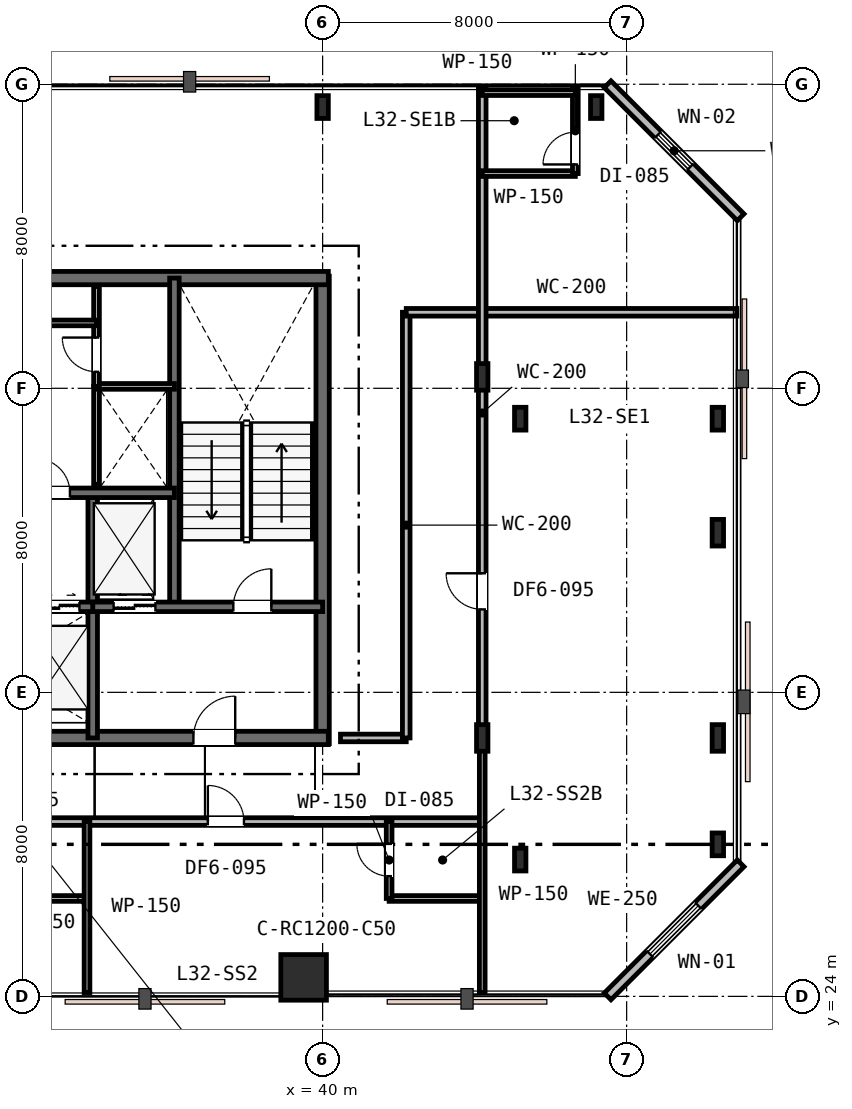
"""IFC4 building model, lengths in metres.
Left out: names, types, materials, properties, quantities, classifications, styles, units other than length and angle.
Written with IfcOpenShell. Run it as: python <this file> out.ifc"""

import sys

from ifc_helpers import new_model, si_unit, direction, frame, frame_2d, origin, origin_2d, place, context, subcontext, project, spatial, rectangle, i_section, extrude, element, fill, save


model = new_model("IFC4")
c1 = context("Model", 3, precision=1e-05, world=origin(), true_north=direction((0.0, 1.0)))
c2 = subcontext(c1, "Body", "Model", "MODEL_VIEW")
j1 = project(units=[si_unit("LENGTHUNIT", "METRE"), si_unit("PLANEANGLEUNIT", "RADIAN")], contexts=[c1])
p1 = place(None, origin())
s1 = spatial("IfcSite", under=j1, at=p1, CompositionType="ELEMENT")
p2 = place(p1, origin())
s2 = spatial("IfcBuilding", under=s1, at=p2, CompositionType="ELEMENT")
p3 = place(p2, frame((0.0, 0.0, 126.0)))
s3 = spatial("IfcBuildingStorey", under=s2, at=p3, CompositionType="ELEMENT", Elevation=126.0)
p4 = place(p3, frame((40.0, 30.65, 0.0), z_axis=(0.0, 0.0, 1.0), x_axis=(0.0, 1.0, 0.0)))
e1 = element("IfcWall", 1, at=p4, inside=s3, PredefinedType="SHEAR", context=c2, shape_type="SweptSolid", body=[
    extrude(rectangle(XDim=12.3, YDim=0.35, at=frame_2d((6.15, 0.0))), origin(), (0.0, 0.0, 1.0), 3.6),
])
p5 = place(p3, frame((15.85, 42.9, 0.0), z_axis=(0.0, 0.0, 1.0), x_axis=(1.0, 0.0, 0.0)))
e2 = element("IfcWall", 2, at=p5, inside=s3, PredefinedType="SHEAR", context=c2, shape_type="SweptSolid", body=[
    extrude(rectangle(XDim=24.3, YDim=0.35, at=frame_2d((12.15, 0.0))), origin(), (0.0, 0.0, 1.0), 3.6),
])
p6 = place(p3, frame((28.95, 30.8, 0.0), z_axis=(0.0, 0.0, 1.0), x_axis=(1.0, 0.0, 0.0)))
e3 = element("IfcWall", 3, at=p6, inside=s3, PredefinedType="SHEAR", context=c2, shape_type="SweptSolid", body=[
    extrude(rectangle(XDim=11.2, YDim=0.35, at=frame_2d((5.6, 0.0))), origin(), (0.0, 0.0, 1.0), 3.6),
])
p7 = place(p6, frame((7.65, 0.0, 0.0)))
e4 = element("IfcOpeningElement", 4, at=p7, cuts=e3, PredefinedType="OPENING", context=c2, shape_type="SweptSolid", body=[
    extrude(rectangle(XDim=1.1, YDim=2.15, at=frame_2d((0.55, 1.075))), frame((0.0, 0.185, 0.0), z_axis=(0.0, -1.0, 0.0), x_axis=(1.0, 0.0, 0.0)), (0.0, 0.0, 1.0), 0.37),
])
p8 = place(p3, frame((36.1, 34.25, 0.0), z_axis=(0.0, 0.0, 1.0), x_axis=(0.0, 1.0, 0.0)))
e5 = element("IfcWall", 5, at=p8, inside=s3, PredefinedType="SHEAR", context=c2, shape_type="SweptSolid", body=[
    extrude(rectangle(XDim=8.65, YDim=0.25, at=frame_2d((4.325, 0.0))), origin(), (0.0, 0.0, 1.0), 3.6),
])
p9 = place(p3, frame((33.95, 30.8, 0.0), z_axis=(0.0, 0.0, 1.0), x_axis=(0.0, 1.0, 0.0)))
e6 = element("IfcWall", 6, at=p9, inside=s3, PredefinedType="SHEAR", context=c2, shape_type="SweptSolid", body=[
    extrude(rectangle(XDim=6.45, YDim=0.25, at=frame_2d((3.225, 0.0))), origin(), (0.0, 0.0, 1.0), 3.6),
])
p10 = place(p3, frame((33.95, 34.25, 0.0), z_axis=(0.0, 0.0, 1.0), x_axis=(1.0, 0.0, 0.0)))
e7 = element("IfcWall", 7, at=p10, inside=s3, PredefinedType="SHEAR", context=c2, shape_type="SweptSolid", body=[
    extrude(rectangle(XDim=6.05, YDim=0.25, at=frame_2d((3.025, 0.0))), origin(), (0.0, 0.0, 1.0), 3.6),
])
p11 = place(p10, frame((3.7, 0.0, 0.0)))
e8 = element("IfcOpeningElement", 8, at=p11, cuts=e7, PredefinedType="OPENING", context=c2, shape_type="SweptSolid", body=[
    extrude(rectangle(XDim=1.0, YDim=2.15, at=frame_2d((0.5, 1.075))), frame((0.0, 0.135, 0.0), z_axis=(0.0, -1.0, 0.0), x_axis=(1.0, 0.0, 0.0)), (0.0, 0.0, 1.0), 0.27),
])
p12 = place(p10, frame((0.55, 0.0, 0.0)))
e9 = element("IfcOpeningElement", 9, at=p12, cuts=e7, PredefinedType="OPENING", context=c2, shape_type="SweptSolid", body=[
    extrude(rectangle(XDim=1.1, YDim=2.15, at=frame_2d((0.55, 1.075))), frame((0.0, 0.135, 0.0), z_axis=(0.0, -1.0, 0.0), x_axis=(1.0, 0.0, 0.0)), (0.0, 0.0, 1.0), 0.27),
])
p13 = place(p3, frame((28.95, 34.25, 0.0), z_axis=(0.0, 0.0, 1.0), x_axis=(1.0, 0.0, 0.0)))
e10 = element("IfcWall", 10, at=p13, inside=s3, PredefinedType="SHEAR", context=c2, shape_type="SweptSolid", body=[
    extrude(rectangle(XDim=5.0, YDim=0.25, at=frame_2d((2.5, 0.0))), origin(), (0.0, 0.0, 1.0), 3.6),
])
p14 = place(p13, frame((0.3, 0.0, 0.0)))
e11 = element("IfcOpeningElement", 11, at=p14, cuts=e10, PredefinedType="OPENING", context=c2, shape_type="SweptSolid", body=[
    extrude(rectangle(XDim=1.05, YDim=2.15, at=frame_2d((0.525, 1.075))), frame((0.0, 0.135, 0.0), z_axis=(0.0, -1.0, 0.0), x_axis=(1.0, 0.0, 0.0)), (0.0, 0.0, 1.0), 0.27),
])
p15 = place(p13, frame((1.95, 0.0, 0.0)))
e12 = element("IfcOpeningElement", 12, at=p15, cuts=e10, PredefinedType="OPENING", context=c2, shape_type="SweptSolid", body=[
    extrude(rectangle(XDim=1.05, YDim=2.15, at=frame_2d((0.525, 1.075))), frame((0.0, 0.135, 0.0), z_axis=(0.0, -1.0, 0.0), x_axis=(1.0, 0.0, 0.0)), (0.0, 0.0, 1.0), 0.27),
])
p16 = place(p13, frame((3.6, 0.0, 0.0)))
e13 = element("IfcOpeningElement", 13, at=p16, cuts=e10, PredefinedType="OPENING", context=c2, shape_type="SweptSolid", body=[
    extrude(rectangle(XDim=1.05, YDim=2.15, at=frame_2d((0.525, 1.075))), frame((0.0, 0.135, 0.0), z_axis=(0.0, -1.0, 0.0), x_axis=(1.0, 0.0, 0.0)), (0.0, 0.0, 1.0), 0.27),
])
p17 = place(p3, frame((19.9, 37.25, 0.0), z_axis=(0.0, 0.0, 1.0), x_axis=(1.0, 0.0, 0.0)))
e14 = element("IfcWall", 14, at=p17, inside=s3, PredefinedType="SHEAR", context=c2, shape_type="SweptSolid", body=[
    extrude(rectangle(XDim=16.2, YDim=0.25, at=frame_2d((8.1, 0.0))), origin(), (0.0, 0.0, 1.0), 3.6),
])
p18 = place(p17, frame((12.55, 0.0, 0.0)))
e15 = element("IfcOpeningElement", 15, at=p18, cuts=e14, PredefinedType="OPENING", context=c2, shape_type="SweptSolid", body=[
    extrude(rectangle(XDim=0.9, YDim=2.15, at=frame_2d((0.45, 1.075))), frame((0.0, 0.135, 0.0), z_axis=(0.0, -1.0, 0.0), x_axis=(1.0, 0.0, 0.0)), (0.0, 0.0, 1.0), 0.27),
])
p19 = place(p3, frame((39.5, 24.5, 0.0), z_axis=(0.0, 0.0, 1.0), x_axis=(1.0, 0.0, 0.0)))
e16 = element("IfcColumn", 16, at=p19, inside=s3, PredefinedType="COLUMN", context=c2, shape_type="SweptSolid", body=[
    extrude(rectangle(XDim=1.2, YDim=1.2, at=origin_2d()), origin(), (0.0, 0.0, 1.0), 3.6),
])
for number, where, z_axis, x_axis in (
    (17, (45.2, 27.6, 0.0), (0.0, 0.0, 1.0), (1.0, 0.0, 0.0)),
    (18, (45.2, 39.2, 0.0), (0.0, 0.0, 1.0), (1.0, 0.0, 0.0)),
    (19, (40.0, 47.4, 0.0), (0.0, 0.0, 1.0), (1.0, 0.0, 0.0)),
    (20, (47.2, 47.4, 0.0), (0.0, 0.0, 1.0), (1.0, 0.0, 0.0)),
    (21, (50.4, 28.0, 0.0), (0.0, 0.0, 1.0), (1.0, 0.0, 0.0)),
    (22, (50.4, 39.2, 0.0), (0.0, 0.0, 1.0), (1.0, 0.0, 0.0)),
):
    element("IfcColumn", number, at=place(p3, frame(where, z_axis=z_axis, x_axis=x_axis)), inside=s3, PredefinedType="COLUMN", context=c2, shape_type="SweptSolid", body=[
        extrude(i_section(OverallWidth=0.3, OverallDepth=0.6, WebThickness=0.015, FlangeThickness=0.03, FilletRadius=0.027, at=origin_2d()), origin(), (0.0, 0.0, 1.0), 3.6),
    ])
for number, where, z_axis, x_axis in (
    (23, (44.2, 30.8, 0.0), (0.0, 0.0, 1.0), (1.0, 0.0, 0.0)),
    (24, (44.2, 40.3, 0.0), (0.0, 0.0, 1.0), (1.0, 0.0, 0.0)),
    (25, (50.4, 30.8, 0.0), (0.0, 0.0, 1.0), (1.0, 0.0, 0.0)),
    (26, (50.4, 36.2, 0.0), (0.0, 0.0, 1.0), (1.0, 0.0, 0.0)),
):
    element("IfcColumn", number, at=place(p3, frame(where, z_axis=z_axis, x_axis=x_axis)), inside=s3, PredefinedType="COLUMN", context=c2, shape_type="SweptSolid", body=[
        extrude(i_section(OverallWidth=0.3, OverallDepth=0.7, WebThickness=0.017, FlangeThickness=0.032, FilletRadius=0.027, at=origin_2d()), origin(), (0.0, 0.0, 1.0), 3.6),
    ])
p20 = place(p3, frame((47.5, 24.0, 0.0), z_axis=(0.0, 0.0, 1.0), x_axis=(0.707106781187, 0.707106781187, 0.0)))
e27 = element("IfcWall", 27, at=p20, inside=s3, PredefinedType="STANDARD", context=c2, shape_type="SweptSolid", body=[
    extrude(rectangle(XDim=4.95, YDim=0.25, at=frame_2d((2.475, 0.0))), origin(), (0.0, 0.0, 1.0), 3.33),
])
p21 = place(p20, frame((1.575, 0.0, 0.75)))
e28 = element("IfcOpeningElement", 28, at=p21, cuts=e27, PredefinedType="OPENING", context=c2, shape_type="SweptSolid", body=[
    extrude(rectangle(XDim=1.8, YDim=1.85, at=frame_2d((0.9, 0.925))), frame((0.0, 0.135, 0.0), z_axis=(0.0, -1.0, 0.0), x_axis=(1.0, 0.0, 0.0)), (0.0, 0.0, 1.0), 0.27),
])
p22 = place(p3, frame((51.0, 44.5, 0.0), z_axis=(0.0, 0.0, 1.0), x_axis=(-0.707106781187, 0.707106781187, 0.0)))
e29 = element("IfcWall", 29, at=p22, inside=s3, PredefinedType="STANDARD", context=c2, shape_type="SweptSolid", body=[
    extrude(rectangle(XDim=4.95, YDim=0.25, at=frame_2d((2.475, 0.0))), origin(), (0.0, 0.0, 1.0), 3.33),
])
p23 = place(p22, frame((1.875, 0.0, 0.85)))
e30 = element("IfcOpeningElement", 30, at=p23, cuts=e29, PredefinedType="OPENING", context=c2, shape_type="SweptSolid", body=[
    extrude(rectangle(XDim=1.2, YDim=1.6, at=frame_2d((0.6, 0.8))), frame((0.0, 0.135, 0.0), z_axis=(0.0, -1.0, 0.0), x_axis=(1.0, 0.0, 0.0)), (0.0, 0.0, 1.0), 0.27),
])
p24 = place(p3, frame((34.05, 37.473, 0.0), z_axis=(0.0, 0.0, 1.0), x_axis=(0.0, 1.0, 0.0)))
e31 = element("IfcWall", 31, at=p24, inside=s3, PredefinedType="PLUMBINGWALL", context=c2, shape_type="SweptSolid", body=[
    extrude(rectangle(XDim=2.577, YDim=0.15, at=frame_2d((1.288, 0.0))), origin(), (0.0, 0.0, 1.0), 3.33),
])
p25 = place(p3, frame((34.05, 40.05, 0.0), z_axis=(0.0, 0.0, 1.0), x_axis=(1.0, 0.0, 0.0)))
e32 = element("IfcWall", 32, at=p25, inside=s3, PredefinedType="PARTITIONING", context=c2, shape_type="SweptSolid", body=[
    extrude(rectangle(XDim=2.05, YDim=0.15, at=frame_2d((1.025, 0.0))), origin(), (0.0, 0.0, 1.0), 3.33),
])
p26 = place(p3, frame((34.05, 40.05, 0.0), z_axis=(0.0, 0.0, 1.0), x_axis=(0.0, 1.0, 0.0)))
e33 = element("IfcWall", 33, at=p26, inside=s3, PredefinedType="PARTITIONING", context=c2, shape_type="SweptSolid", body=[
    extrude(rectangle(XDim=2.63, YDim=0.15, at=frame_2d((1.315, 0.0))), origin(), (0.0, 0.0, 1.0), 3.33),
])
p27 = place(p26, frame((0.385, 0.0, 0.0)))
e34 = element("IfcOpeningElement", 34, at=p27, cuts=e33, PredefinedType="OPENING", context=c2, shape_type="SweptSolid", body=[
    extrude(rectangle(XDim=0.9, YDim=2.15, at=frame_2d((0.45, 1.075))), frame((0.0, 0.085, 0.0), z_axis=(0.0, -1.0, 0.0), x_axis=(1.0, 0.0, 0.0)), (0.0, 0.0, 1.0), 0.17),
])
p28 = place(p3, frame((22.08, 41.72, 0.0), z_axis=(0.0, 0.0, 1.0), x_axis=(1.0, 0.0, 0.0)))
e35 = element("IfcWall", 35, at=p28, inside=s3, PredefinedType="PARTITIONING", context=c2, shape_type="SweptSolid", body=[
    extrude(rectangle(XDim=11.97, YDim=0.15, at=frame_2d((5.985, 0.0))), origin(), (0.0, 0.0, 1.0), 3.33),
])
p29 = place(p28, frame((5.535, 0.0, 0.0)))
e36 = element("IfcOpeningElement", 36, at=p29, cuts=e35, PredefinedType="OPENING", context=c2, shape_type="SweptSolid", body=[
    extrude(rectangle(XDim=0.9, YDim=2.15, at=frame_2d((0.45, 1.075))), frame((0.0, 0.085, 0.0), z_axis=(0.0, -1.0, 0.0), x_axis=(1.0, 0.0, 0.0)), (0.0, 0.0, 1.0), 0.17),
])
p30 = place(p3, frame((7.2, 28.6, 0.0), z_axis=(0.0, 0.0, 1.0), x_axis=(1.0, 0.0, 0.0)))
e37 = element("IfcWall", 37, at=p30, inside=s3, PredefinedType="PARTITIONING", context=c2, shape_type="SweptSolid", body=[
    extrude(rectangle(XDim=37.0, YDim=0.2, at=frame_2d((18.5, 0.0))), origin(), (0.0, 0.0, 1.0), 2.87),
])
p31 = place(p30, frame((19.71, 0.0, 0.0)))
e38 = element("IfcOpeningElement", 38, at=p31, cuts=e37, PredefinedType="OPENING", context=c2, shape_type="SweptSolid", body=[
    extrude(rectangle(XDim=0.95, YDim=2.15, at=frame_2d((0.475, 1.075))), frame((0.0, 0.11, 0.0), z_axis=(0.0, -1.0, 0.0), x_axis=(1.0, 0.0, 0.0)), (0.0, 0.0, 1.0), 0.22),
])
p32 = place(p30, frame((29.78, 0.0, 0.0)))
e39 = element("IfcOpeningElement", 39, at=p32, cuts=e37, PredefinedType="OPENING", context=c2, shape_type="SweptSolid", body=[
    extrude(rectangle(XDim=0.95, YDim=2.15, at=frame_2d((0.475, 1.075))), frame((0.0, 0.11, 0.0), z_axis=(0.0, -1.0, 0.0), x_axis=(1.0, 0.0, 0.0)), (0.0, 0.0, 1.0), 0.22),
])
p33 = place(p3, frame((40.47, 30.8, 0.0), z_axis=(0.0, 0.0, 1.0), x_axis=(1.0, 0.0, 0.0)))
e40 = element("IfcWall", 40, at=p33, inside=s3, PredefinedType="PARTITIONING", context=c2, shape_type="SweptSolid", body=[
    extrude(rectangle(XDim=1.73, YDim=0.2, at=frame_2d((0.865, 0.0))), origin(), (0.0, 0.0, 1.0), 2.87),
])
p34 = place(p3, frame((42.2, 30.8, 0.0), z_axis=(0.0, 0.0, 1.0), x_axis=(0.0, 1.0, 0.0)))
e41 = element("IfcWall", 41, at=p34, inside=s3, PredefinedType="PARTITIONING", context=c2, shape_type="SweptSolid", body=[
    extrude(rectangle(XDim=11.2, YDim=0.2, at=frame_2d((5.6, 0.0))), origin(), (0.0, 0.0, 1.0), 2.87),
])
p35 = place(p3, frame((42.2, 42.0, 0.0), z_axis=(0.0, 0.0, 1.0), x_axis=(1.0, 0.0, 0.0)))
e42 = element("IfcWall", 42, at=p35, inside=s3, PredefinedType="PARTITIONING", context=c2, shape_type="SweptSolid", body=[
    extrude(rectangle(XDim=8.7, YDim=0.2, at=frame_2d((4.35, 0.0))), origin(), (0.0, 0.0, 1.0), 3.33),
])
p36 = place(p3, frame((31.35, 26.576, 0.0), z_axis=(0.0, 0.0, 1.0), x_axis=(1.0, 0.0, 0.0)))
e43 = element("IfcWall", 43, at=p36, inside=s3, PredefinedType="PARTITIONING", context=c2, shape_type="SweptSolid", body=[
    extrude(rectangle(XDim=2.45, YDim=0.15, at=frame_2d((1.225, 0.0))), origin(), (0.0, 0.0, 1.0), 3.33),
])
p37 = place(p3, frame((33.8, 28.6, 0.0), z_axis=(0.0, 0.0, 1.0), x_axis=(0.0, -1.0, 0.0)))
e44 = element("IfcWall", 44, at=p37, inside=s3, PredefinedType="PARTITIONING", context=c2, shape_type="SweptSolid", body=[
    extrude(rectangle(XDim=4.5, YDim=0.15, at=frame_2d((2.25, 0.0))), origin(), (0.0, 0.0, 1.0), 2.96),
])
p38 = place(p3, frame((41.75, 26.576, 0.0), z_axis=(0.0, 0.0, 1.0), x_axis=(1.0, 0.0, 0.0)))
e45 = element("IfcWall", 45, at=p38, inside=s3, PredefinedType="PARTITIONING", context=c2, shape_type="SweptSolid", body=[
    extrude(rectangle(XDim=2.45, YDim=0.15, at=frame_2d((1.225, 0.0))), origin(), (0.0, 0.0, 1.0), 3.33),
])
p39 = place(p3, frame((41.75, 26.576, 0.0), z_axis=(0.0, 0.0, 1.0), x_axis=(0.0, 1.0, 0.0)))
e46 = element("IfcWall", 46, at=p39, inside=s3, PredefinedType="PARTITIONING", context=c2, shape_type="SweptSolid", body=[
    extrude(rectangle(XDim=2.024, YDim=0.15, at=frame_2d((1.012, 0.0))), origin(), (0.0, 0.0, 1.0), 3.33),
])
p40 = place(p39, frame((0.587, 0.0, 0.0)))
e47 = element("IfcOpeningElement", 47, at=p40, cuts=e46, PredefinedType="OPENING", context=c2, shape_type="SweptSolid", body=[
    extrude(rectangle(XDim=0.85, YDim=2.15, at=frame_2d((0.425, 1.075))), frame((0.0, 0.085, 0.0), z_axis=(0.0, -1.0, 0.0), x_axis=(1.0, 0.0, 0.0)), (0.0, 0.0, 1.0), 0.17),
])
p41 = place(p3, frame((44.2, 30.8, 0.0), z_axis=(0.0, 0.0, 1.0), x_axis=(0.0, -1.0, 0.0)))
e48 = element("IfcWall", 48, at=p41, inside=s3, PredefinedType="PARTITIONING", context=c2, shape_type="SweptSolid", body=[
    extrude(rectangle(XDim=6.7, YDim=0.15, at=frame_2d((3.35, 0.0))), origin(), (0.0, 0.0, 1.0), 2.87),
])
p42 = place(p3, frame((44.2, 30.8, 0.0), z_axis=(0.0, 0.0, 1.0), x_axis=(0.0, 1.0, 0.0)))
e49 = element("IfcWall", 49, at=p42, inside=s3, PredefinedType="PARTITIONING", context=c2, shape_type="SweptSolid", body=[
    extrude(rectangle(XDim=17.1, YDim=0.2, at=frame_2d((8.55, 0.0))), origin(), (0.0, 0.0, 1.0), 2.87),
])
p43 = place(p42, frame((3.382, 0.0, 0.0)))
e50 = element("IfcOpeningElement", 50, at=p43, cuts=e49, PredefinedType="OPENING", context=c2, shape_type="SweptSolid", body=[
    extrude(rectangle(XDim=0.95, YDim=2.15, at=frame_2d((0.475, 1.075))), frame((0.0, 0.11, 0.0), z_axis=(0.0, -1.0, 0.0), x_axis=(1.0, 0.0, 0.0)), (0.0, 0.0, 1.0), 0.22),
])
p44 = place(p3, frame((44.2, 45.65, 0.0), z_axis=(0.0, 0.0, 1.0), x_axis=(1.0, 0.0, 0.0)))
e51 = element("IfcWall", 51, at=p44, inside=s3, PredefinedType="PARTITIONING", context=c2, shape_type="SweptSolid", body=[
    extrude(rectangle(XDim=2.45, YDim=0.15, at=frame_2d((1.225, 0.0))), origin(), (0.0, 0.0, 1.0), 3.33),
])
p45 = place(p3, frame((46.65, 45.65, 0.0), z_axis=(0.0, 0.0, 1.0), x_axis=(0.0, 1.0, 0.0)))
e52 = element("IfcWall", 52, at=p45, inside=s3, PredefinedType="PARTITIONING", context=c2, shape_type="SweptSolid", body=[
    extrude(rectangle(XDim=2.25, YDim=0.15, at=frame_2d((1.125, 0.0))), origin(), (0.0, 0.0, 1.0), 2.96),
])
p46 = place(p45, frame((0.24, 0.0, 0.0)))
e53 = element("IfcOpeningElement", 53, at=p46, cuts=e52, PredefinedType="OPENING", context=c2, shape_type="SweptSolid", body=[
    extrude(rectangle(XDim=0.85, YDim=2.15, at=frame_2d((0.425, 1.075))), frame((0.0, 0.085, 0.0), z_axis=(0.0, -1.0, 0.0), x_axis=(1.0, 0.0, 0.0)), (0.0, 0.0, 1.0), 0.17),
])
p47 = place(p3, frame((44.2, 47.78, 0.0), z_axis=(0.0, 0.0, 1.0), x_axis=(1.0, 0.0, 0.0)))
e54 = element("IfcWall", 54, at=p47, inside=s3, PredefinedType="PARTITIONING", context=c2, shape_type="SweptSolid", body=[
    extrude(rectangle(XDim=2.45, YDim=0.15, at=frame_2d((1.225, 0.0))), origin(), (0.0, 0.0, 1.0), 2.96),
])
p48 = place(p21, origin())
e55 = element("IfcWindow", 55, at=p48, inside=s3, PartitioningType="SINGLE_PANEL", PredefinedType="WINDOW", context=c2, shape_type="SweptSolid", body=[
    extrude(rectangle(XDim=1.8, YDim=1.85, at=frame_2d((0.9, 0.925))), frame((0.0, 0.03, 0.0), z_axis=(0.0, -1.0, 0.0), x_axis=(1.0, 0.0, 0.0)), (0.0, 0.0, 1.0), 0.06),
])
fill(e28, e55)
p49 = place(p23, origin())
e56 = element("IfcWindow", 56, at=p49, inside=s3, PartitioningType="SINGLE_PANEL", PredefinedType="WINDOW", context=c2, shape_type="SweptSolid", body=[
    extrude(rectangle(XDim=1.2, YDim=1.6, at=frame_2d((0.6, 0.8))), frame((0.0, 0.03, 0.0), z_axis=(0.0, -1.0, 0.0), x_axis=(1.0, 0.0, 0.0)), (0.0, 0.0, 1.0), 0.06),
])
fill(e30, e56)
p50 = place(p11, origin())
e57 = element("IfcDoor", 57, at=p50, inside=s3, OperationType="SINGLE_SWING_RIGHT", PredefinedType="DOOR", context=c2, shape_type="SweptSolid", body=[
    extrude(rectangle(XDim=1.0, YDim=2.15, at=frame_2d((0.5, 1.075))), frame((0.0, 0.025, 0.0), z_axis=(0.0, -1.0, 0.0), x_axis=(1.0, 0.0, 0.0)), (0.0, 0.0, 1.0), 0.05),
])
fill(e8, e57)
p51 = place(p7, origin())
e58 = element("IfcDoor", 58, at=p51, inside=s3, OperationType="SINGLE_SWING_RIGHT", PredefinedType="DOOR", context=c2, shape_type="SweptSolid", body=[
    extrude(rectangle(XDim=1.1, YDim=2.15, at=frame_2d((0.55, 1.075))), frame((0.0, 0.025, 0.0), z_axis=(0.0, -1.0, 0.0), x_axis=(1.0, 0.0, 0.0)), (0.0, 0.0, 1.0), 0.05),
])
fill(e4, e58)
p52 = place(p18, origin())
e59 = element("IfcDoor", 59, at=p52, inside=s3, OperationType="SINGLE_SWING_LEFT", PredefinedType="DOOR", context=c2, shape_type="SweptSolid", body=[
    extrude(rectangle(XDim=0.9, YDim=2.15, at=frame_2d((0.45, 1.075))), frame((0.0, 0.025, 0.0), z_axis=(0.0, -1.0, 0.0), x_axis=(1.0, 0.0, 0.0)), (0.0, 0.0, 1.0), 0.05),
])
fill(e15, e59)
p53 = place(p27, origin())
e60 = element("IfcDoor", 60, at=p53, inside=s3, OperationType="SINGLE_SWING_RIGHT", PredefinedType="DOOR", context=c2, shape_type="SweptSolid", body=[
    extrude(rectangle(XDim=0.9, YDim=2.15, at=frame_2d((0.45, 1.075))), frame((0.0, 0.025, 0.0), z_axis=(0.0, -1.0, 0.0), x_axis=(1.0, 0.0, 0.0)), (0.0, 0.0, 1.0), 0.05),
])
fill(e34, e60)
p54 = place(p32, origin())
e61 = element("IfcDoor", 61, at=p54, inside=s3, OperationType="SINGLE_SWING_LEFT", PredefinedType="DOOR", context=c2, shape_type="SweptSolid", body=[
    extrude(rectangle(XDim=0.95, YDim=2.15, at=frame_2d((0.475, 1.075))), frame((0.0, 0.025, 0.0), z_axis=(0.0, -1.0, 0.0), x_axis=(1.0, 0.0, 0.0)), (0.0, 0.0, 1.0), 0.05),
])
fill(e39, e61)
p55 = place(p40, origin())
e62 = element("IfcDoor", 62, at=p55, inside=s3, OperationType="SINGLE_SWING_RIGHT", PredefinedType="DOOR", context=c2, shape_type="SweptSolid", body=[
    extrude(rectangle(XDim=0.85, YDim=2.15, at=frame_2d((0.425, 1.075))), frame((0.0, 0.025, 0.0), z_axis=(0.0, -1.0, 0.0), x_axis=(1.0, 0.0, 0.0)), (0.0, 0.0, 1.0), 0.05),
])
fill(e47, e62)
p56 = place(p43, origin())
e63 = element("IfcDoor", 63, at=p56, inside=s3, OperationType="SINGLE_SWING_RIGHT", PredefinedType="DOOR", context=c2, shape_type="SweptSolid", body=[
    extrude(rectangle(XDim=0.95, YDim=2.15, at=frame_2d((0.475, 1.075))), frame((0.0, 0.025, 0.0), z_axis=(0.0, -1.0, 0.0), x_axis=(1.0, 0.0, 0.0)), (0.0, 0.0, 1.0), 0.05),
])
fill(e50, e63)
p57 = place(p46, origin())
e64 = element("IfcDoor", 64, at=p57, inside=s3, OperationType="SINGLE_SWING_LEFT", PredefinedType="DOOR", context=c2, shape_type="SweptSolid", body=[
    extrude(rectangle(XDim=0.85, YDim=2.15, at=frame_2d((0.425, 1.075))), frame((0.0, 0.025, 0.0), z_axis=(0.0, -1.0, 0.0), x_axis=(1.0, 0.0, 0.0)), (0.0, 0.0, 1.0), 0.05),
])
fill(e53, e64)
p58 = place(p12, origin())
e65 = element("IfcDoor", 65, at=p58, inside=s3, OperationType="DOUBLE_DOOR_SLIDING", PredefinedType="DOOR", context=c2, shape_type="SweptSolid", body=[
    extrude(rectangle(XDim=1.1, YDim=2.15, at=frame_2d((0.55, 1.075))), frame((0.0, 0.025, 0.0), z_axis=(0.0, -1.0, 0.0), x_axis=(1.0, 0.0, 0.0)), (0.0, 0.0, 1.0), 0.05),
])
fill(e9, e65)
p59 = place(p16, origin())
e66 = element("IfcDoor", 66, at=p59, inside=s3, OperationType="DOUBLE_DOOR_SLIDING", PredefinedType="DOOR", context=c2, shape_type="SweptSolid", body=[
    extrude(rectangle(XDim=1.05, YDim=2.15, at=frame_2d((0.525, 1.075))), frame((0.0, 0.025, 0.0), z_axis=(0.0, -1.0, 0.0), x_axis=(1.0, 0.0, 0.0)), (0.0, 0.0, 1.0), 0.05),
])
fill(e13, e66)
save(model, sys.argv[1])
